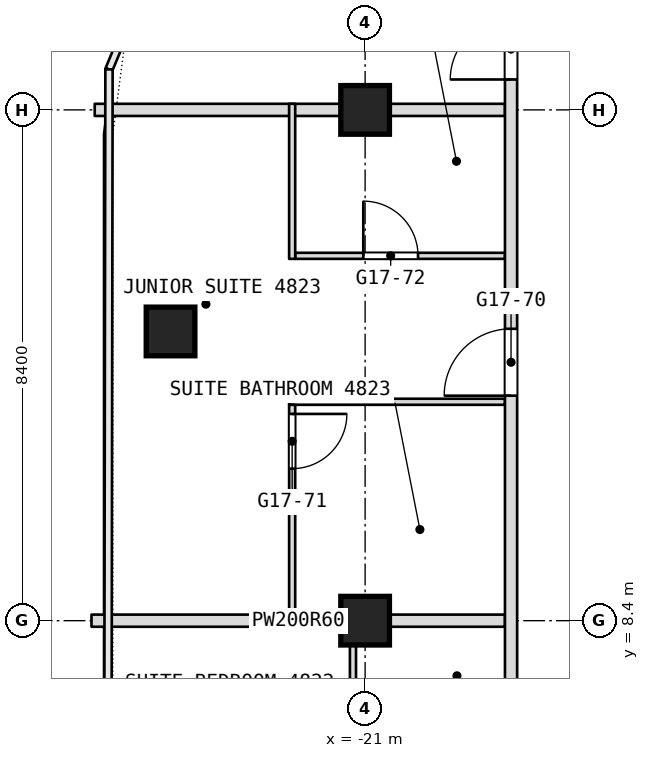
"""IFC4 building model, lengths in metres.
Left out: names, types, materials, properties, quantities, classifications, styles, units other than length and angle.
Written with IfcOpenShell. Run it as: python <this file> out.ifc"""

import sys

from ifc_helpers import new_model, si_unit, direction, frame, frame_2d, origin, origin_2d, place, context, subcontext, project, spatial, rectangle, extrude, element, fill, save


model = new_model("IFC4")
c1 = context("Model", 3, precision=1e-05, world=origin(), true_north=direction((0.0, 1.0)))
c2 = subcontext(c1, "Body", "Model", "MODEL_VIEW")
j1 = project(units=[si_unit("LENGTHUNIT", "METRE"), si_unit("PLANEANGLEUNIT", "RADIAN")], contexts=[c1])
p1 = place(None, origin())
s1 = spatial("IfcSite", under=j1, at=p1, CompositionType="ELEMENT")
p2 = place(p1, origin())
s2 = spatial("IfcBuilding", under=s1, at=p2, CompositionType="ELEMENT")
p3 = place(p2, frame((0.0, 0.0, 209.3)))
s3 = spatial("IfcBuildingStorey", under=s2, at=p3, CompositionType="ELEMENT", Elevation=209.3)
for number, where, z_axis, x_axis in (
    (1, (-21.0, 8.4, 0.0), (0.0, 0.0, 1.0), (1.0, 0.0, 0.0)),
    (2, (-21.0, 16.8, 0.0), (0.0, 0.0, 1.0), (1.0, 0.0, 0.0)),
    (3, (-24.2, 13.156, 0.0), (0.0, 0.0, 1.0), (1.0, 0.0, 0.0)),
):
    element("IfcColumn", number, at=place(p3, frame(where, z_axis=z_axis, x_axis=x_axis)), inside=s3, PredefinedType="COLUMN", context=c2, shape_type="SweptSolid", body=[
        extrude(rectangle(XDim=0.8, YDim=0.8, at=origin_2d()), origin(), (0.0, 0.0, 1.0), 3.6),
    ])
p4 = place(p3, frame((-25.5, 8.4, 0.0), z_axis=(0.0, 0.0, 1.0), x_axis=(1.0, 0.0, 0.0)))
e4 = element("IfcWall", 4, at=p4, inside=s3, PredefinedType="PARTITIONING", context=c2, shape_type="SweptSolid", body=[
    extrude(rectangle(XDim=6.8, YDim=0.2, at=frame_2d((3.4, 0.0))), origin(), (0.0, 0.0, 1.0), 2.94),
])
p5 = place(p3, frame((-22.25, 12.0, 0.0), z_axis=(0.0, 0.0, 1.0), x_axis=(1.0, 0.0, 0.0)))
e5 = element("IfcWall", 5, at=p5, inside=s3, PredefinedType="PARTITIONING", context=c2, shape_type="SweptSolid", body=[
    extrude(rectangle(XDim=3.55, YDim=0.1, at=frame_2d((1.775, 0.0))), origin(), (0.0, 0.0, 1.0), 3.34),
])
p6 = place(p3, frame((-22.15, 14.4, 0.0), z_axis=(0.0, 0.0, 1.0), x_axis=(1.0, 0.0, 0.0)))
e6 = element("IfcWall", 6, at=p6, inside=s3, PredefinedType="PARTITIONING", context=c2, shape_type="SweptSolid", body=[
    extrude(rectangle(XDim=3.45, YDim=0.1, at=frame_2d((1.725, 0.0))), origin(), (0.0, 0.0, 1.0), 3.34),
])
p7 = place(p6, frame((1.12, 0.0, 0.0)))
e7 = element("IfcOpeningElement", 7, at=p7, cuts=e6, PredefinedType="OPENING", context=c2, shape_type="SweptSolid", body=[
    extrude(rectangle(XDim=0.9, YDim=2.1, at=frame_2d((0.45, 1.05))), frame((0.0, 0.05, 0.0), z_axis=(0.0, -1.0, 0.0), x_axis=(1.0, 0.0, 0.0)), (0.0, 0.0, 1.0), 0.1),
])
p8 = place(p3, frame((-25.447, 16.8, 0.0), z_axis=(0.0, 0.0, 1.0), x_axis=(1.0, 0.0, 0.0)))
e8 = element("IfcWall", 8, at=p8, inside=s3, PredefinedType="PARTITIONING", context=c2, shape_type="SweptSolid", body=[
    extrude(rectangle(XDim=6.747, YDim=0.2, at=frame_2d((3.374, 0.0))), origin(), (0.0, 0.0, 1.0), 2.94),
])
p9 = place(p3, frame((-18.6, -26.751, 0.0), z_axis=(0.0, 0.0, 1.0), x_axis=(0.0, 1.0, 0.0)))
e9 = element("IfcWall", 9, at=p9, inside=s3, PredefinedType="PARTITIONING", context=c2, shape_type="SweptSolid", body=[
    extrude(rectangle(XDim=49.091, YDim=0.2, at=frame_2d((24.545, 0.0))), origin(), (0.0, 0.0, 1.0), 3.34),
])
p10 = place(p9, frame((3.413, 0.0, 0.0)))
e10 = element("IfcOpeningElement", 10, at=p10, cuts=e9, PredefinedType="OPENING", context=c2, shape_type="SweptSolid", body=[
    extrude(rectangle(XDim=1.0, YDim=2.1, at=frame_2d((0.5, 1.05))), frame((0.0, 0.1, 0.0), z_axis=(0.0, -1.0, 0.0), x_axis=(1.0, 0.0, 0.0)), (0.0, 0.0, 1.0), 0.2),
])
p11 = place(p9, frame((5.838, 0.0, 0.0)))
e11 = element("IfcOpeningElement", 11, at=p11, cuts=e9, PredefinedType="OPENING", context=c2, shape_type="SweptSolid", body=[
    extrude(rectangle(XDim=1.0, YDim=2.1, at=frame_2d((0.5, 1.05))), frame((0.0, 0.1, 0.0), z_axis=(0.0, -1.0, 0.0), x_axis=(1.0, 0.0, 0.0)), (0.0, 0.0, 1.0), 0.2),
])
p12 = place(p9, frame((13.551, 0.0, 0.0)))
e12 = element("IfcOpeningElement", 12, at=p12, cuts=e9, PredefinedType="OPENING", context=c2, shape_type="SweptSolid", body=[
    extrude(rectangle(XDim=1.1, YDim=2.1, at=frame_2d((0.55, 1.05))), frame((0.0, 0.1, 0.0), z_axis=(0.0, -1.0, 0.0), x_axis=(1.0, 0.0, 0.0)), (0.0, 0.0, 1.0), 0.2),
])
p13 = place(p9, frame((21.151, 0.0, 0.0)))
e13 = element("IfcOpeningElement", 13, at=p13, cuts=e9, PredefinedType="OPENING", context=c2, shape_type="SweptSolid", body=[
    extrude(rectangle(XDim=1.0, YDim=2.1, at=frame_2d((0.5, 1.05))), frame((0.0, 0.1, 0.0), z_axis=(0.0, -1.0, 0.0), x_axis=(1.0, 0.0, 0.0)), (0.0, 0.0, 1.0), 0.2),
])
p14 = place(p9, frame((22.951, 0.0, 0.0)))
e14 = element("IfcOpeningElement", 14, at=p14, cuts=e9, PredefinedType="OPENING", context=c2, shape_type="SweptSolid", body=[
    extrude(rectangle(XDim=1.0, YDim=2.1, at=frame_2d((0.5, 1.05))), frame((0.0, 0.1, 0.0), z_axis=(0.0, -1.0, 0.0), x_axis=(1.0, 0.0, 0.0)), (0.0, 0.0, 1.0), 0.2),
])
p15 = place(p9, frame((28.301, 0.0, 0.0)))
e15 = element("IfcOpeningElement", 15, at=p15, cuts=e9, PredefinedType="OPENING", context=c2, shape_type="SweptSolid", body=[
    extrude(rectangle(XDim=1.1, YDim=2.1, at=frame_2d((0.55, 1.05))), frame((0.0, 0.1, 0.0), z_axis=(0.0, -1.0, 0.0), x_axis=(1.0, 0.0, 0.0)), (0.0, 0.0, 1.0), 0.2),
])
p16 = place(p9, frame((38.851, 0.0, 0.0)))
e16 = element("IfcOpeningElement", 16, at=p16, cuts=e9, PredefinedType="OPENING", context=c2, shape_type="SweptSolid", body=[
    extrude(rectangle(XDim=1.1, YDim=2.1, at=frame_2d((0.55, 1.05))), frame((0.0, 0.1, 0.0), z_axis=(0.0, -1.0, 0.0), x_axis=(1.0, 0.0, 0.0)), (0.0, 0.0, 1.0), 0.2),
])
p17 = place(p9, frame((44.051, 0.0, 0.0)))
e17 = element("IfcOpeningElement", 17, at=p17, cuts=e9, PredefinedType="OPENING", context=c2, shape_type="SweptSolid", body=[
    extrude(rectangle(XDim=1.0, YDim=2.1, at=frame_2d((0.5, 1.05))), frame((0.0, 0.1, 0.0), z_axis=(0.0, -1.0, 0.0), x_axis=(1.0, 0.0, 0.0)), (0.0, 0.0, 1.0), 0.2),
])
p18 = place(p3, frame((-21.2, 5.95, 0.0), z_axis=(0.0, 0.0, 1.0), x_axis=(0.0, 1.0, 0.0)))
e18 = element("IfcWall", 18, at=p18, inside=s3, PredefinedType="PARTITIONING", context=c2, shape_type="SweptSolid", body=[
    extrude(rectangle(XDim=2.55, YDim=0.1, at=frame_2d((1.275, 0.0))), origin(), (0.0, 0.0, 1.0), 3.34),
])
p19 = place(p18, frame((0.15, 0.0, 0.0)))
e19 = element("IfcOpeningElement", 19, at=p19, cuts=e18, PredefinedType="OPENING", context=c2, shape_type="SweptSolid", body=[
    extrude(rectangle(XDim=0.9, YDim=2.1, at=frame_2d((0.45, 1.05))), frame((0.0, 0.05, 0.0), z_axis=(0.0, -1.0, 0.0), x_axis=(1.0, 0.0, 0.0)), (0.0, 0.0, 1.0), 0.1),
])
p20 = place(p3, frame((-22.2, 8.5, 0.0), z_axis=(0.0, 0.0, 1.0), x_axis=(0.0, 1.0, 0.0)))
e20 = element("IfcWall", 20, at=p20, inside=s3, PredefinedType="PARTITIONING", context=c2, shape_type="SweptSolid", body=[
    extrude(rectangle(XDim=3.45, YDim=0.1, at=frame_2d((1.725, 0.0))), origin(), (0.0, 0.0, 1.0), 3.34),
])
p21 = place(p20, frame((2.4, 0.0, 0.0)))
e21 = element("IfcOpeningElement", 21, at=p21, cuts=e20, PredefinedType="OPENING", context=c2, shape_type="SweptSolid", body=[
    extrude(rectangle(XDim=0.9, YDim=2.1, at=frame_2d((0.45, 1.05))), frame((0.0, 0.05, 0.0), z_axis=(0.0, -1.0, 0.0), x_axis=(1.0, 0.0, 0.0)), (0.0, 0.0, 1.0), 0.1),
])
p22 = place(p3, frame((-22.2, 14.35, 0.0), z_axis=(0.0, 0.0, 1.0), x_axis=(0.0, 1.0, 0.0)))
e22 = element("IfcWall", 22, at=p22, inside=s3, PredefinedType="PARTITIONING", context=c2, shape_type="SweptSolid", body=[
    extrude(rectangle(XDim=2.55, YDim=0.1, at=frame_2d((1.275, 0.0))), origin(), (0.0, 0.0, 1.0), 3.34),
])
p23 = place(p7, origin())
e23 = element("IfcDoor", 23, at=p23, inside=s3, OperationType="SINGLE_SWING_LEFT", PredefinedType="DOOR", context=c2, shape_type="SweptSolid", body=[
    extrude(rectangle(XDim=0.9, YDim=2.1, at=frame_2d((0.45, 1.05))), frame((0.0, 0.025, 0.0), z_axis=(0.0, -1.0, 0.0), x_axis=(1.0, 0.0, 0.0)), (0.0, 0.0, 1.0), 0.05),
])
fill(e7, e23)
p24 = place(p16, origin())
e24 = element("IfcDoor", 24, at=p24, inside=s3, OperationType="SINGLE_SWING_LEFT", PredefinedType="DOOR", context=c2, shape_type="SweptSolid", body=[
    extrude(rectangle(XDim=1.1, YDim=2.1, at=frame_2d((0.55, 1.05))), frame((0.0, 0.025, 0.0), z_axis=(0.0, -1.0, 0.0), x_axis=(1.0, 0.0, 0.0)), (0.0, 0.0, 1.0), 0.05),
])
fill(e16, e24)
p25 = place(p17, origin())
e25 = element("IfcDoor", 25, at=p25, inside=s3, OperationType="SINGLE_SWING_RIGHT", PredefinedType="DOOR", context=c2, shape_type="SweptSolid", body=[
    extrude(rectangle(XDim=1.0, YDim=2.1, at=frame_2d((0.5, 1.05))), frame((0.0, 0.025, 0.0), z_axis=(0.0, -1.0, 0.0), x_axis=(1.0, 0.0, 0.0)), (0.0, 0.0, 1.0), 0.05),
])
fill(e17, e25)
p26 = place(p21, origin())
e26 = element("IfcDoor", 26, at=p26, inside=s3, OperationType="SINGLE_SWING_LEFT", PredefinedType="DOOR", context=c2, shape_type="SweptSolid", body=[
    extrude(rectangle(XDim=0.9, YDim=2.1, at=frame_2d((0.45, 1.05))), frame((0.0, 0.025, 0.0), z_axis=(0.0, -1.0, 0.0), x_axis=(1.0, 0.0, 0.0)), (0.0, 0.0, 1.0), 0.05),
])
fill(e21, e26)
save(model, sys.argv[1])
